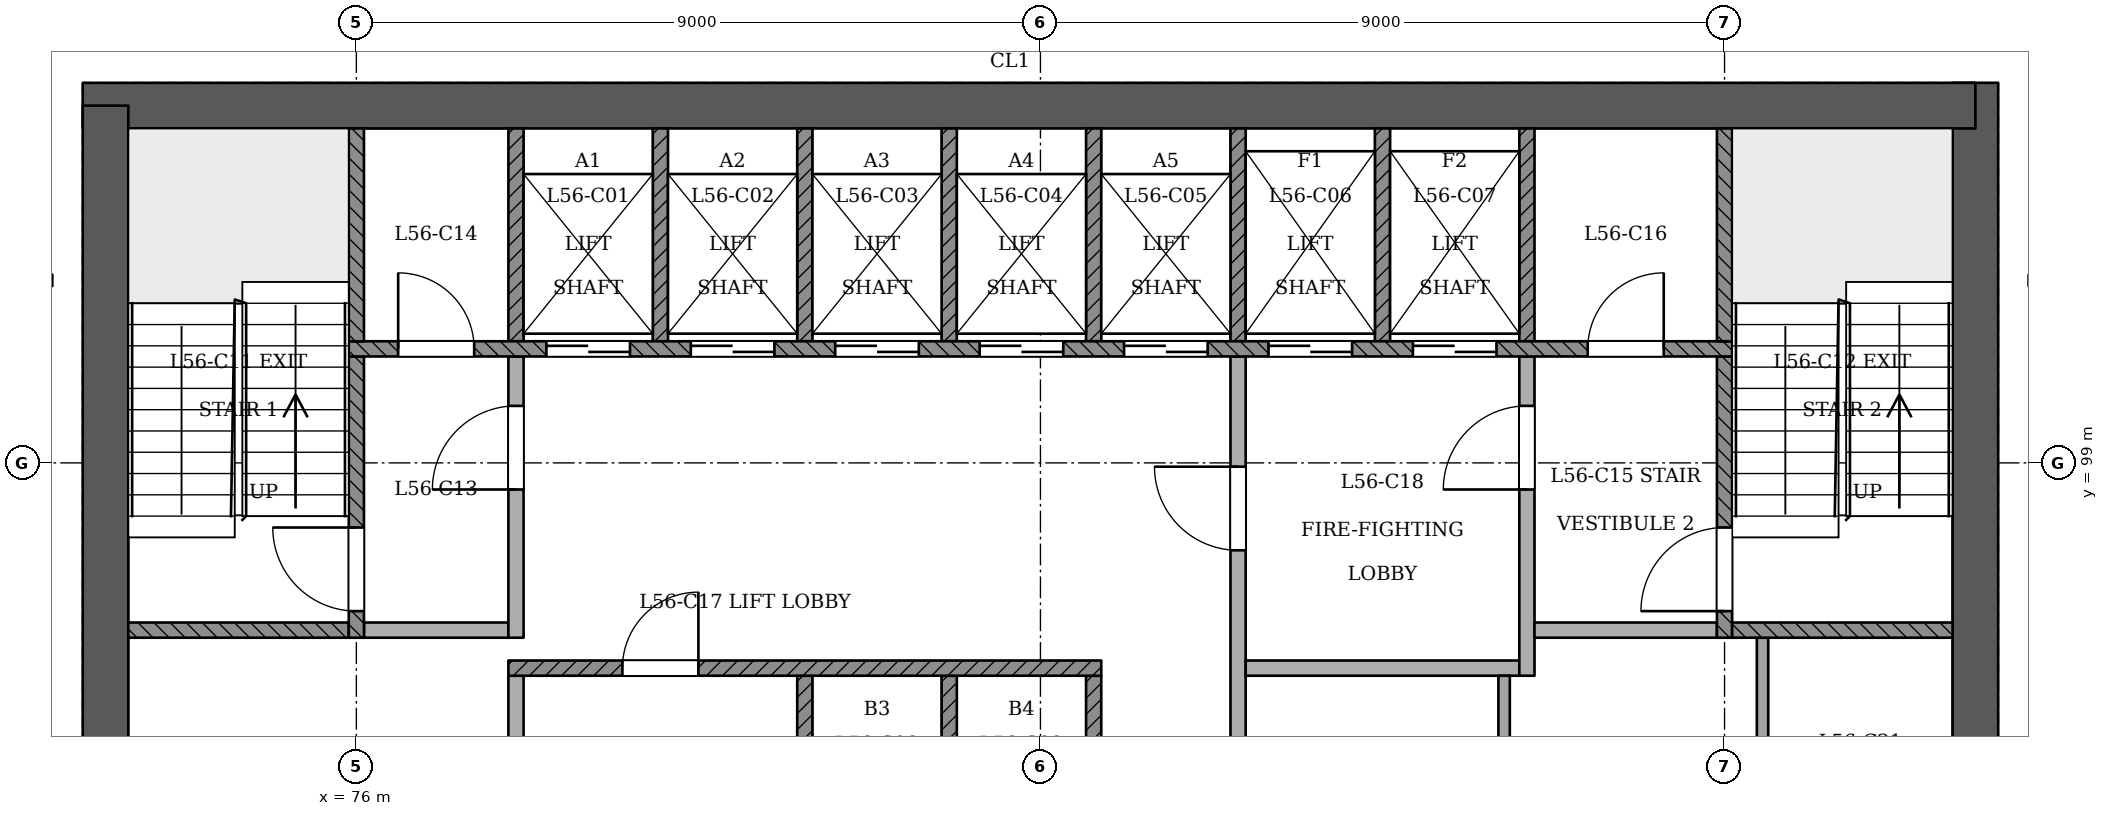
"""IFC4 building model, lengths in metres.
Left out: names, types, materials, properties, quantities, classifications, styles, units other than length and angle.
Written with IfcOpenShell. Run it as: python <this file> out.ifc"""

import sys

from ifc_helpers import new_model, si_unit, direction, frame, frame_2d, origin, place, context, subcontext, project, spatial, rectangle, extrude, element, fill, save


model = new_model("IFC4")
c1 = context("Model", 3, precision=1e-05, world=origin(), true_north=direction((0.0, 1.0)))
c2 = subcontext(c1, "Body", "Model", "MODEL_VIEW")
j1 = project(units=[si_unit("LENGTHUNIT", "METRE"), si_unit("PLANEANGLEUNIT", "RADIAN")], contexts=[c1])
p1 = place(None, origin())
s1 = spatial("IfcSite", under=j1, at=p1, CompositionType="ELEMENT")
p2 = place(p1, origin())
s2 = spatial("IfcBuilding", under=s1, at=p2, CompositionType="ELEMENT")
p3 = place(p2, frame((0.0, 0.0, 219.4)))
s3 = spatial("IfcBuildingStorey", under=s2, at=p3, CompositionType="ELEMENT", Elevation=219.4)
p4 = place(p3, frame((97.3, 93.1, 0.0), z_axis=(0.0, 0.0, 1.0), x_axis=(0.0, 1.0, 0.0)))
e1 = element("IfcWall", 1, at=p4, inside=s3, PredefinedType="SHEAR", context=c2, shape_type="SweptSolid", body=[
    extrude(rectangle(XDim=10.9, YDim=0.6, at=frame_2d((5.45, 0.0))), origin(), (0.0, 0.0, 1.0), 3.6),
])
p5 = place(p3, frame((97.3, 103.7, 0.0), z_axis=(0.0, 0.0, 1.0), x_axis=(-1.0, 0.0, 0.0)))
e2 = element("IfcWall", 2, at=p5, inside=s3, PredefinedType="SHEAR", context=c2, shape_type="SweptSolid", body=[
    extrude(rectangle(XDim=24.9, YDim=0.6, at=frame_2d((12.45, 0.0))), origin(), (0.0, 0.0, 1.0), 3.6),
])
p6 = place(p3, frame((72.7, 103.7, 0.0), z_axis=(0.0, 0.0, 1.0), x_axis=(0.0, -1.0, 0.0)))
e3 = element("IfcWall", 3, at=p6, inside=s3, PredefinedType="SHEAR", context=c2, shape_type="SweptSolid", body=[
    extrude(rectangle(XDim=10.9, YDim=0.6, at=frame_2d((5.45, 0.0))), origin(), (0.0, 0.0, 1.0), 3.6),
])
p7 = place(p3, frame((78.1, 93.4, 0.0), z_axis=(0.0, 0.0, 1.0), x_axis=(0.0, 1.0, 0.0)))
e4 = element("IfcWall", 4, at=p7, inside=s3, PredefinedType="PARTITIONING", context=c2, shape_type="SweptSolid", body=[
    extrude(rectangle(XDim=2.8, YDim=0.2, at=frame_2d((1.4, 0.0))), origin(), (0.0, 0.0, 1.0), 3.2),
])
for number, where, z_axis, x_axis in (
    (5, (81.9, 93.4, 0.0), (0.0, 0.0, 1.0), (0.0, 1.0, 0.0)),
    (6, (83.8, 93.4, 0.0), (0.0, 0.0, 1.0), (0.0, 1.0, 0.0)),
    (7, (85.7, 93.4, 0.0), (0.0, 0.0, 1.0), (0.0, 1.0, 0.0)),
):
    element("IfcWall", number, at=place(p3, frame(where, z_axis=z_axis, x_axis=x_axis)), inside=s3, PredefinedType="SOLIDWALL", context=c2, shape_type="SweptSolid", body=[
        extrude(rectangle(XDim=2.8, YDim=0.2, at=frame_2d((1.4, 0.0))), origin(), (0.0, 0.0, 1.0), 3.2),
    ])
p8 = place(p3, frame((87.6, 93.4, 0.0), z_axis=(0.0, 0.0, 1.0), x_axis=(0.0, 1.0, 0.0)))
e8 = element("IfcWall", 8, at=p8, inside=s3, PredefinedType="PARTITIONING", context=c2, shape_type="SweptSolid", body=[
    extrude(rectangle(XDim=7.0, YDim=0.2, at=frame_2d((3.5, 0.0))), origin(), (0.0, 0.0, 1.0), 3.2),
])
p9 = place(p8, frame((4.45, 0.0, 0.0)))
e9 = element("IfcOpeningElement", 9, at=p9, cuts=e8, PredefinedType="OPENING", context=c2, shape_type="SweptSolid", body=[
    extrude(rectangle(XDim=1.1, YDim=2.1, at=frame_2d((0.55, 1.05))), frame((0.0, 0.11, 0.0), z_axis=(0.0, -1.0, 0.0), x_axis=(1.0, 0.0, 0.0)), (0.0, 0.0, 1.0), 0.221),
])
p10 = place(p3, frame((91.1, 93.4, 0.0), z_axis=(0.0, 0.0, 1.0), x_axis=(0.0, 1.0, 0.0)))
e10 = element("IfcWall", 10, at=p10, inside=s3, PredefinedType="PARTITIONING", context=c2, shape_type="SweptSolid", body=[
    extrude(rectangle(XDim=2.8, YDim=0.15, at=frame_2d((1.4, 0.0))), origin(), (0.0, 0.0, 1.0), 3.2),
])
p11 = place(p3, frame((94.5, 93.4, 0.0), z_axis=(0.0, 0.0, 1.0), x_axis=(0.0, 1.0, 0.0)))
e11 = element("IfcWall", 11, at=p11, inside=s3, PredefinedType="PARTITIONING", context=c2, shape_type="SweptSolid", body=[
    extrude(rectangle(XDim=3.3, YDim=0.15, at=frame_2d((1.65, 0.0))), origin(), (0.0, 0.0, 1.0), 3.2),
])
p12 = place(p3, frame((78.0, 96.3, 0.0), z_axis=(0.0, 0.0, 1.0), x_axis=(1.0, 0.0, 0.0)))
e12 = element("IfcWall", 12, at=p12, inside=s3, PredefinedType="SOLIDWALL", context=c2, shape_type="SweptSolid", body=[
    extrude(rectangle(XDim=7.8, YDim=0.2, at=frame_2d((3.9, 0.0))), origin(), (0.0, 0.0, 1.0), 3.2),
])
p13 = place(p12, frame((1.5, 0.0, 0.0)))
e13 = element("IfcOpeningElement", 13, at=p13, cuts=e12, PredefinedType="OPENING", context=c2, shape_type="SweptSolid", body=[
    extrude(rectangle(XDim=1.0, YDim=2.1, at=frame_2d((0.5, 1.05))), frame((0.0, 0.11, 0.0), z_axis=(0.0, -1.0, 0.0), x_axis=(1.0, 0.0, 0.0)), (0.0, 0.0, 1.0), 0.221),
])
p14 = place(p3, frame((87.7, 96.3, 0.0), z_axis=(0.0, 0.0, 1.0), x_axis=(1.0, 0.0, 0.0)))
e14 = element("IfcWall", 14, at=p14, inside=s3, PredefinedType="PARTITIONING", context=c2, shape_type="SweptSolid", body=[
    extrude(rectangle(XDim=3.6, YDim=0.2, at=frame_2d((1.8, 0.0))), origin(), (0.0, 0.0, 1.0), 3.2),
])
p15 = place(p3, frame((91.4, 96.2, 0.0), z_axis=(0.0, 0.0, 1.0), x_axis=(0.0, 1.0, 0.0)))
e15 = element("IfcWall", 15, at=p15, inside=s3, PredefinedType="PARTITIONING", context=c2, shape_type="SweptSolid", body=[
    extrude(rectangle(XDim=4.2, YDim=0.2, at=frame_2d((2.1, 0.0))), origin(), (0.0, 0.0, 1.0), 3.2),
])
p16 = place(p15, frame((2.45, 0.0, 0.0)))
e16 = element("IfcOpeningElement", 16, at=p16, cuts=e15, PredefinedType="OPENING", context=c2, shape_type="SweptSolid", body=[
    extrude(rectangle(XDim=1.1, YDim=2.1, at=frame_2d((0.55, 1.05))), frame((0.0, 0.11, 0.0), z_axis=(0.0, -1.0, 0.0), x_axis=(1.0, 0.0, 0.0)), (0.0, 0.0, 1.0), 0.221),
])
p17 = place(p3, frame((73.0, 96.8, 0.0), z_axis=(0.0, 0.0, 1.0), x_axis=(1.0, 0.0, 0.0)))
e17 = element("IfcWall", 17, at=p17, inside=s3, PredefinedType="SOLIDWALL", context=c2, shape_type="SweptSolid", body=[
    extrude(rectangle(XDim=2.9, YDim=0.2, at=frame_2d((1.45, 0.0))), origin(), (0.0, 0.0, 1.0), 3.2),
])
p18 = place(p3, frame((76.0, 96.7, 0.0), z_axis=(0.0, 0.0, 1.0), x_axis=(0.0, 1.0, 0.0)))
e18 = element("IfcWall", 18, at=p18, inside=s3, PredefinedType="SOLIDWALL", context=c2, shape_type="SweptSolid", body=[
    extrude(rectangle(XDim=3.7, YDim=0.2, at=frame_2d((1.85, 0.0))), origin(), (0.0, 0.0, 1.0), 3.2),
])
p19 = place(p18, frame((0.35, 0.0, 0.0)))
e19 = element("IfcOpeningElement", 19, at=p19, cuts=e18, PredefinedType="OPENING", context=c2, shape_type="SweptSolid", body=[
    extrude(rectangle(XDim=1.1, YDim=2.1, at=frame_2d((0.55, 1.05))), frame((0.0, 0.11, 0.0), z_axis=(0.0, -1.0, 0.0), x_axis=(1.0, 0.0, 0.0)), (0.0, 0.0, 1.0), 0.221),
])
p20 = place(p3, frame((76.1, 96.8, 0.0), z_axis=(0.0, 0.0, 1.0), x_axis=(1.0, 0.0, 0.0)))
e20 = element("IfcWall", 20, at=p20, inside=s3, PredefinedType="PARTITIONING", context=c2, shape_type="SweptSolid", body=[
    extrude(rectangle(XDim=1.9, YDim=0.2, at=frame_2d((0.95, 0.0))), origin(), (0.0, 0.0, 1.0), 3.2),
])
p21 = place(p3, frame((78.1, 96.7, 0.0), z_axis=(0.0, 0.0, 1.0), x_axis=(0.0, 1.0, 0.0)))
e21 = element("IfcWall", 21, at=p21, inside=s3, PredefinedType="PARTITIONING", context=c2, shape_type="SweptSolid", body=[
    extrude(rectangle(XDim=3.7, YDim=0.2, at=frame_2d((1.85, 0.0))), origin(), (0.0, 0.0, 1.0), 3.2),
])
p22 = place(p21, frame((1.95, 0.0, 0.0)))
e22 = element("IfcOpeningElement", 22, at=p22, cuts=e21, PredefinedType="OPENING", context=c2, shape_type="SweptSolid", body=[
    extrude(rectangle(XDim=1.1, YDim=2.1, at=frame_2d((0.55, 1.05))), frame((0.0, 0.11, 0.0), z_axis=(0.0, -1.0, 0.0), x_axis=(1.0, 0.0, 0.0)), (0.0, 0.0, 1.0), 0.221),
])
p23 = place(p3, frame((91.5, 96.8, 0.0), z_axis=(0.0, 0.0, 1.0), x_axis=(1.0, 0.0, 0.0)))
e23 = element("IfcWall", 23, at=p23, inside=s3, PredefinedType="PARTITIONING", context=c2, shape_type="SweptSolid", body=[
    extrude(rectangle(XDim=2.4, YDim=0.2, at=frame_2d((1.2, 0.0))), origin(), (0.0, 0.0, 1.0), 3.2),
])
p24 = place(p3, frame((94.0, 96.7, 0.0), z_axis=(0.0, 0.0, 1.0), x_axis=(0.0, 1.0, 0.0)))
e24 = element("IfcWall", 24, at=p24, inside=s3, PredefinedType="SOLIDWALL", context=c2, shape_type="SweptSolid", body=[
    extrude(rectangle(XDim=3.7, YDim=0.2, at=frame_2d((1.85, 0.0))), origin(), (0.0, 0.0, 1.0), 3.2),
])
p25 = place(p24, frame((0.35, 0.0, 0.0)))
e25 = element("IfcOpeningElement", 25, at=p25, cuts=e24, PredefinedType="OPENING", context=c2, shape_type="SweptSolid", body=[
    extrude(rectangle(XDim=1.1, YDim=2.1, at=frame_2d((0.55, 1.05))), frame((0.0, 0.11, 0.0), z_axis=(0.0, -1.0, 0.0), x_axis=(1.0, 0.0, 0.0)), (0.0, 0.0, 1.0), 0.221),
])
p26 = place(p3, frame((94.1, 96.8, 0.0), z_axis=(0.0, 0.0, 1.0), x_axis=(1.0, 0.0, 0.0)))
e26 = element("IfcWall", 26, at=p26, inside=s3, PredefinedType="SOLIDWALL", context=c2, shape_type="SweptSolid", body=[
    extrude(rectangle(XDim=2.9, YDim=0.2, at=frame_2d((1.45, 0.0))), origin(), (0.0, 0.0, 1.0), 3.2),
])
p27 = place(p3, frame((75.9, 100.5, 0.0), z_axis=(0.0, 0.0, 1.0), x_axis=(1.0, 0.0, 0.0)))
e27 = element("IfcWall", 27, at=p27, inside=s3, PredefinedType="SOLIDWALL", context=c2, shape_type="SweptSolid", body=[
    extrude(rectangle(XDim=18.2, YDim=0.2, at=frame_2d((9.1, 0.0))), origin(), (0.0, 0.0, 1.0), 3.2),
])
p28 = place(p27, frame((2.6, 0.0, 0.0)))
e28 = element("IfcOpeningElement", 28, at=p28, cuts=e27, PredefinedType="OPENING", context=c2, shape_type="SweptSolid", body=[
    extrude(rectangle(XDim=1.1, YDim=2.1, at=frame_2d((0.55, 1.05))), frame((0.0, 0.11, 0.0), z_axis=(0.0, -1.0, 0.0), x_axis=(1.0, 0.0, 0.0)), (0.0, 0.0, 1.0), 0.221),
])
p29 = place(p27, frame((4.5, 0.0, 0.0)))
e29 = element("IfcOpeningElement", 29, at=p29, cuts=e27, PredefinedType="OPENING", context=c2, shape_type="SweptSolid", body=[
    extrude(rectangle(XDim=1.1, YDim=2.1, at=frame_2d((0.55, 1.05))), frame((0.0, 0.11, 0.0), z_axis=(0.0, -1.0, 0.0), x_axis=(1.0, 0.0, 0.0)), (0.0, 0.0, 1.0), 0.221),
])
p30 = place(p27, frame((6.4, 0.0, 0.0)))
e30 = element("IfcOpeningElement", 30, at=p30, cuts=e27, PredefinedType="OPENING", context=c2, shape_type="SweptSolid", body=[
    extrude(rectangle(XDim=1.1, YDim=2.1, at=frame_2d((0.55, 1.05))), frame((0.0, 0.11, 0.0), z_axis=(0.0, -1.0, 0.0), x_axis=(1.0, 0.0, 0.0)), (0.0, 0.0, 1.0), 0.221),
])
p31 = place(p27, frame((8.3, 0.0, 0.0)))
e31 = element("IfcOpeningElement", 31, at=p31, cuts=e27, PredefinedType="OPENING", context=c2, shape_type="SweptSolid", body=[
    extrude(rectangle(XDim=1.1, YDim=2.1, at=frame_2d((0.55, 1.05))), frame((0.0, 0.11, 0.0), z_axis=(0.0, -1.0, 0.0), x_axis=(1.0, 0.0, 0.0)), (0.0, 0.0, 1.0), 0.221),
])
p32 = place(p27, frame((10.2, 0.0, 0.0)))
e32 = element("IfcOpeningElement", 32, at=p32, cuts=e27, PredefinedType="OPENING", context=c2, shape_type="SweptSolid", body=[
    extrude(rectangle(XDim=1.1, YDim=2.1, at=frame_2d((0.55, 1.05))), frame((0.0, 0.11, 0.0), z_axis=(0.0, -1.0, 0.0), x_axis=(1.0, 0.0, 0.0)), (0.0, 0.0, 1.0), 0.221),
])
p33 = place(p27, frame((12.1, 0.0, 0.0)))
e33 = element("IfcOpeningElement", 33, at=p33, cuts=e27, PredefinedType="OPENING", context=c2, shape_type="SweptSolid", body=[
    extrude(rectangle(XDim=1.1, YDim=2.1, at=frame_2d((0.55, 1.05))), frame((0.0, 0.11, 0.0), z_axis=(0.0, -1.0, 0.0), x_axis=(1.0, 0.0, 0.0)), (0.0, 0.0, 1.0), 0.221),
])
p34 = place(p27, frame((14.0, 0.0, 0.0)))
e34 = element("IfcOpeningElement", 34, at=p34, cuts=e27, PredefinedType="OPENING", context=c2, shape_type="SweptSolid", body=[
    extrude(rectangle(XDim=1.1, YDim=2.1, at=frame_2d((0.55, 1.05))), frame((0.0, 0.11, 0.0), z_axis=(0.0, -1.0, 0.0), x_axis=(1.0, 0.0, 0.0)), (0.0, 0.0, 1.0), 0.221),
])
p35 = place(p27, frame((0.65, 0.0, 0.0)))
e35 = element("IfcOpeningElement", 35, at=p35, cuts=e27, PredefinedType="OPENING", context=c2, shape_type="SweptSolid", body=[
    extrude(rectangle(XDim=1.0, YDim=2.1, at=frame_2d((0.5, 1.05))), frame((0.0, 0.11, 0.0), z_axis=(0.0, -1.0, 0.0), x_axis=(1.0, 0.0, 0.0)), (0.0, 0.0, 1.0), 0.221),
])
p36 = place(p27, frame((16.3, 0.0, 0.0)))
e36 = element("IfcOpeningElement", 36, at=p36, cuts=e27, PredefinedType="OPENING", context=c2, shape_type="SweptSolid", body=[
    extrude(rectangle(XDim=1.0, YDim=2.1, at=frame_2d((0.5, 1.05))), frame((0.0, 0.11, 0.0), z_axis=(0.0, -1.0, 0.0), x_axis=(1.0, 0.0, 0.0)), (0.0, 0.0, 1.0), 0.221),
])
for number, where, z_axis, x_axis in (
    (37, (76.0, 100.6, 0.0), (0.0, 0.0, 1.0), (0.0, 1.0, 0.0)),
    (38, (78.1, 100.6, 0.0), (0.0, 0.0, 1.0), (0.0, 1.0, 0.0)),
    (39, (80.0, 100.6, 0.0), (0.0, 0.0, 1.0), (0.0, 1.0, 0.0)),
    (40, (81.9, 100.6, 0.0), (0.0, 0.0, 1.0), (0.0, 1.0, 0.0)),
    (41, (83.8, 100.6, 0.0), (0.0, 0.0, 1.0), (0.0, 1.0, 0.0)),
    (42, (85.7, 100.6, 0.0), (0.0, 0.0, 1.0), (0.0, 1.0, 0.0)),
    (43, (87.6, 100.6, 0.0), (0.0, 0.0, 1.0), (0.0, 1.0, 0.0)),
    (44, (89.5, 100.6, 0.0), (0.0, 0.0, 1.0), (0.0, 1.0, 0.0)),
    (45, (91.4, 100.6, 0.0), (0.0, 0.0, 1.0), (0.0, 1.0, 0.0)),
    (46, (94.0, 100.6, 0.0), (0.0, 0.0, 1.0), (0.0, 1.0, 0.0)),
):
    element("IfcWall", number, at=place(p3, frame(where, z_axis=z_axis, x_axis=x_axis)), inside=s3, PredefinedType="SOLIDWALL", context=c2, shape_type="SweptSolid", body=[
        extrude(rectangle(XDim=2.8, YDim=0.2, at=frame_2d((1.4, 0.0))), origin(), (0.0, 0.0, 1.0), 3.2),
    ])
p37 = place(p28, origin())
e47 = element("IfcDoor", 47, at=p37, inside=s3, OperationType="SLIDING_TO_RIGHT", PredefinedType="NOTDEFINED", context=c2, shape_type="SweptSolid", body=[
    extrude(rectangle(XDim=1.1, YDim=2.1, at=frame_2d((0.55, 1.05))), frame((0.0, 0.025, 0.0), z_axis=(0.0, -1.0, 0.0), x_axis=(1.0, 0.0, 0.0)), (0.0, 0.0, 1.0), 0.05),
])
fill(e28, e47)
p38 = place(p29, origin())
e48 = element("IfcDoor", 48, at=p38, inside=s3, OperationType="SLIDING_TO_LEFT", PredefinedType="NOTDEFINED", context=c2, shape_type="SweptSolid", body=[
    extrude(rectangle(XDim=1.1, YDim=2.1, at=frame_2d((0.55, 1.05))), frame((0.0, 0.025, 0.0), z_axis=(0.0, -1.0, 0.0), x_axis=(1.0, 0.0, 0.0)), (0.0, 0.0, 1.0), 0.05),
])
fill(e29, e48)
p39 = place(p30, origin())
e49 = element("IfcDoor", 49, at=p39, inside=s3, OperationType="SLIDING_TO_RIGHT", PredefinedType="NOTDEFINED", context=c2, shape_type="SweptSolid", body=[
    extrude(rectangle(XDim=1.1, YDim=2.1, at=frame_2d((0.55, 1.05))), frame((0.0, 0.025, 0.0), z_axis=(0.0, -1.0, 0.0), x_axis=(1.0, 0.0, 0.0)), (0.0, 0.0, 1.0), 0.05),
])
fill(e30, e49)
p40 = place(p31, origin())
e50 = element("IfcDoor", 50, at=p40, inside=s3, OperationType="SLIDING_TO_LEFT", PredefinedType="NOTDEFINED", context=c2, shape_type="SweptSolid", body=[
    extrude(rectangle(XDim=1.1, YDim=2.1, at=frame_2d((0.55, 1.05))), frame((0.0, 0.025, 0.0), z_axis=(0.0, -1.0, 0.0), x_axis=(1.0, 0.0, 0.0)), (0.0, 0.0, 1.0), 0.05),
])
fill(e31, e50)
p41 = place(p32, origin())
e51 = element("IfcDoor", 51, at=p41, inside=s3, OperationType="SLIDING_TO_RIGHT", PredefinedType="NOTDEFINED", context=c2, shape_type="SweptSolid", body=[
    extrude(rectangle(XDim=1.1, YDim=2.1, at=frame_2d((0.55, 1.05))), frame((0.0, 0.025, 0.0), z_axis=(0.0, -1.0, 0.0), x_axis=(1.0, 0.0, 0.0)), (0.0, 0.0, 1.0), 0.05),
])
fill(e32, e51)
p42 = place(p33, origin())
e52 = element("IfcDoor", 52, at=p42, inside=s3, OperationType="SLIDING_TO_RIGHT", PredefinedType="NOTDEFINED", context=c2, shape_type="SweptSolid", body=[
    extrude(rectangle(XDim=1.1, YDim=2.1, at=frame_2d((0.55, 1.05))), frame((0.0, 0.025, 0.0), z_axis=(0.0, -1.0, 0.0), x_axis=(1.0, 0.0, 0.0)), (0.0, 0.0, 1.0), 0.05),
])
fill(e33, e52)
p43 = place(p34, origin())
e53 = element("IfcDoor", 53, at=p43, inside=s3, OperationType="SLIDING_TO_LEFT", PredefinedType="NOTDEFINED", context=c2, shape_type="SweptSolid", body=[
    extrude(rectangle(XDim=1.1, YDim=2.1, at=frame_2d((0.55, 1.05))), frame((0.0, 0.025, 0.0), z_axis=(0.0, -1.0, 0.0), x_axis=(1.0, 0.0, 0.0)), (0.0, 0.0, 1.0), 0.05),
])
fill(e34, e53)
p44 = place(p19, origin())
e54 = element("IfcDoor", 54, at=p44, inside=s3, OperationType="SINGLE_SWING_RIGHT", PredefinedType="NOTDEFINED", context=c2, shape_type="SweptSolid", body=[
    extrude(rectangle(XDim=1.1, YDim=2.1, at=frame_2d((0.55, 1.05))), frame((0.0, 0.025, 0.0), z_axis=(0.0, -1.0, 0.0), x_axis=(1.0, 0.0, 0.0)), (0.0, 0.0, 1.0), 0.05),
])
fill(e19, e54)
p45 = place(p25, origin())
e55 = element("IfcDoor", 55, at=p45, inside=s3, OperationType="SINGLE_SWING_LEFT", PredefinedType="NOTDEFINED", context=c2, shape_type="SweptSolid", body=[
    extrude(rectangle(XDim=1.1, YDim=2.1, at=frame_2d((0.55, 1.05))), frame((0.0, 0.025, 0.0), z_axis=(0.0, -1.0, 0.0), x_axis=(1.0, 0.0, 0.0)), (0.0, 0.0, 1.0), 0.05),
])
fill(e25, e55)
p46 = place(p22, origin())
e56 = element("IfcDoor", 56, at=p46, inside=s3, OperationType="SINGLE_SWING_LEFT", PredefinedType="NOTDEFINED", context=c2, shape_type="SweptSolid", body=[
    extrude(rectangle(XDim=1.1, YDim=2.1, at=frame_2d((0.55, 1.05))), frame((0.0, 0.025, 0.0), z_axis=(0.0, -1.0, 0.0), x_axis=(1.0, 0.0, 0.0)), (0.0, 0.0, 1.0), 0.05),
])
fill(e22, e56)
p47 = place(p9, origin())
e57 = element("IfcDoor", 57, at=p47, inside=s3, OperationType="SINGLE_SWING_RIGHT", PredefinedType="NOTDEFINED", context=c2, shape_type="SweptSolid", body=[
    extrude(rectangle(XDim=1.1, YDim=2.1, at=frame_2d((0.55, 1.05))), frame((0.0, 0.025, 0.0), z_axis=(0.0, -1.0, 0.0), x_axis=(1.0, 0.0, 0.0)), (0.0, 0.0, 1.0), 0.05),
])
fill(e9, e57)
p48 = place(p16, origin())
e58 = element("IfcDoor", 58, at=p48, inside=s3, OperationType="SINGLE_SWING_LEFT", PredefinedType="NOTDEFINED", context=c2, shape_type="SweptSolid", body=[
    extrude(rectangle(XDim=1.1, YDim=2.1, at=frame_2d((0.55, 1.05))), frame((0.0, 0.025, 0.0), z_axis=(0.0, -1.0, 0.0), x_axis=(1.0, 0.0, 0.0)), (0.0, 0.0, 1.0), 0.05),
])
fill(e16, e58)
p49 = place(p35, origin())
e59 = element("IfcDoor", 59, at=p49, inside=s3, OperationType="SINGLE_SWING_LEFT", PredefinedType="NOTDEFINED", context=c2, shape_type="SweptSolid", body=[
    extrude(rectangle(XDim=1.0, YDim=2.1, at=frame_2d((0.5, 1.05))), frame((0.0, 0.025, 0.0), z_axis=(0.0, -1.0, 0.0), x_axis=(1.0, 0.0, 0.0)), (0.0, 0.0, 1.0), 0.05),
])
fill(e35, e59)
p50 = place(p36, origin())
e60 = element("IfcDoor", 60, at=p50, inside=s3, OperationType="SINGLE_SWING_RIGHT", PredefinedType="NOTDEFINED", context=c2, shape_type="SweptSolid", body=[
    extrude(rectangle(XDim=1.0, YDim=2.1, at=frame_2d((0.5, 1.05))), frame((0.0, 0.025, 0.0), z_axis=(0.0, -1.0, 0.0), x_axis=(1.0, 0.0, 0.0)), (0.0, 0.0, 1.0), 0.05),
])
fill(e36, e60)
p51 = place(p13, origin())
e61 = element("IfcDoor", 61, at=p51, inside=s3, OperationType="SINGLE_SWING_RIGHT", PredefinedType="NOTDEFINED", context=c2, shape_type="SweptSolid", body=[
    extrude(rectangle(XDim=1.0, YDim=2.1, at=frame_2d((0.5, 1.05))), frame((0.0, 0.025, 0.0), z_axis=(0.0, -1.0, 0.0), x_axis=(1.0, 0.0, 0.0)), (0.0, 0.0, 1.0), 0.05),
])
fill(e13, e61)
save(model, sys.argv[1])
